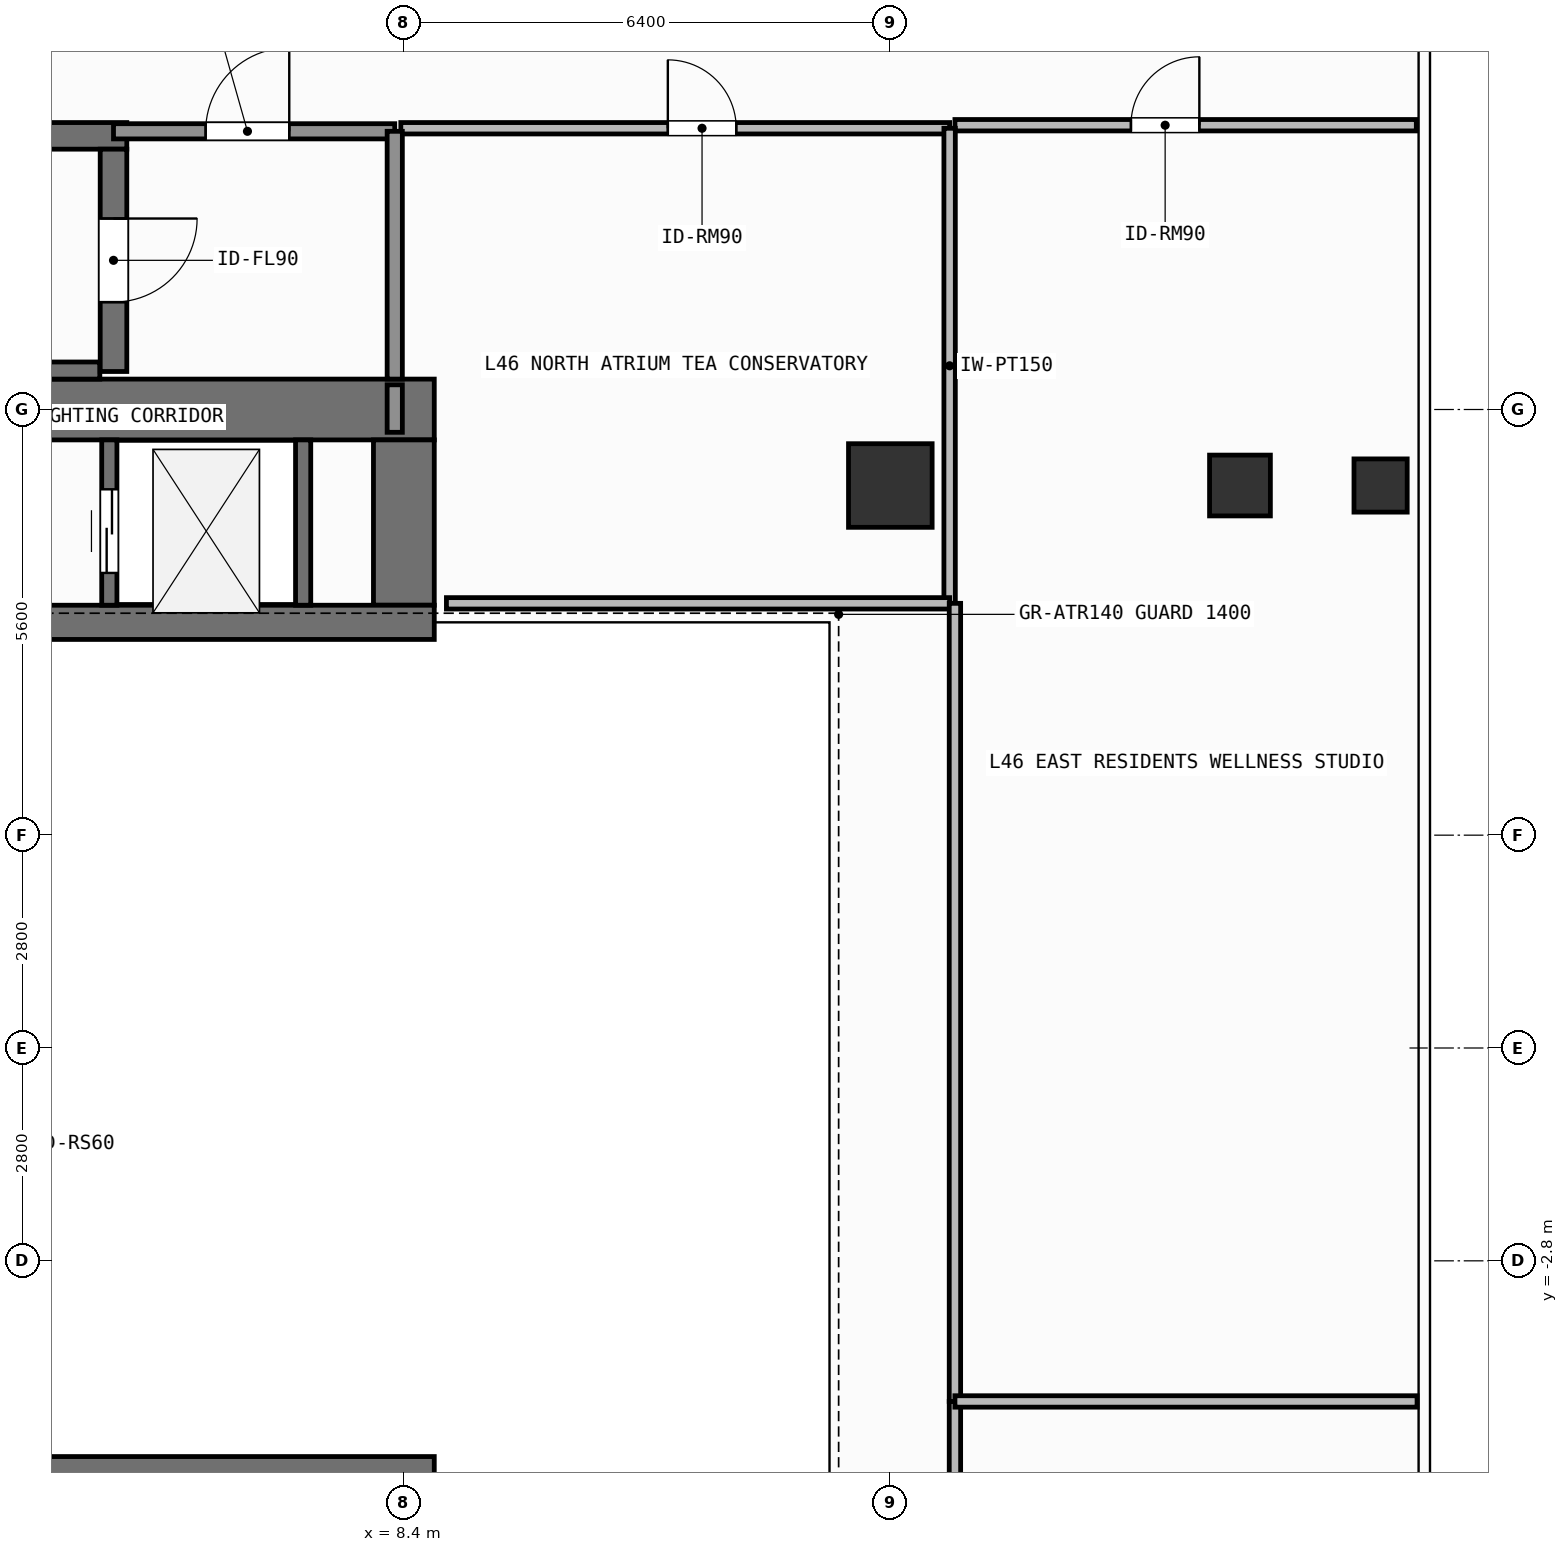
"""IFC4 building model, lengths in metres.
Left out: names, types, materials, properties, quantities, classifications, styles, units other than length and angle.
Written with IfcOpenShell. Run it as: python <this file> out.ifc"""

import sys

from ifc_helpers import new_model, si_unit, direction, frame, frame_2d, origin, origin_2d, place, context, subcontext, project, spatial, rectangle, hollow_rectangle, extrude, element, fill, save


model = new_model("IFC4")
c1 = context("Model", 3, precision=1e-05, world=origin(), true_north=direction((0.0, 1.0)))
c2 = subcontext(c1, "Body", "Model", "MODEL_VIEW")
j1 = project(units=[si_unit("LENGTHUNIT", "METRE"), si_unit("PLANEANGLEUNIT", "RADIAN")], contexts=[c1])
p1 = place(None, origin())
s1 = spatial("IfcSite", under=j1, at=p1, CompositionType="ELEMENT")
p2 = place(p1, origin())
s2 = spatial("IfcBuilding", under=s1, at=p2, CompositionType="ELEMENT")
p3 = place(p2, frame((0.0, 0.0, 187.5)))
s3 = spatial("IfcBuildingStorey", under=s2, at=p3, CompositionType="ELEMENT", Elevation=187.5)
p4 = place(p3, frame((-7.55, 8.4, 0.0), z_axis=(0.0, 0.0, 1.0), x_axis=(1.0, 0.0, 0.0)))
e1 = element("IfcWall", 1, at=p4, inside=s3, PredefinedType="SHEAR", context=c2, shape_type="SweptSolid", body=[
    extrude(rectangle(XDim=16.35, YDim=0.8, at=frame_2d((8.175, 0.0))), origin(), (0.0, 0.0, 1.0), 3.9),
])
p5 = place(p3, frame((8.4, 5.825, 0.0), z_axis=(0.0, 0.0, 1.0), x_axis=(0.0, 1.0, 0.0)))
e2 = element("IfcWall", 2, at=p5, inside=s3, PredefinedType="SHEAR", context=c2, shape_type="SweptSolid", body=[
    extrude(rectangle(XDim=2.175, YDim=0.8, at=frame_2d((1.087, 0.0))), origin(), (0.0, 0.0, 1.0), 3.9),
])
for number, where, z_axis, x_axis in (
    (3, (3.045, -5.6, 0.0), (0.0, 0.0, 1.0), (1.0, 0.0, 0.0)),
    (4, (3.045, 5.6, 0.0), (0.0, 0.0, 1.0), (1.0, 0.0, 0.0)),
):
    element("IfcWall", number, at=place(p3, frame(where, z_axis=z_axis, x_axis=x_axis)), inside=s3, PredefinedType="SHEAR", context=c2, shape_type="SweptSolid", body=[
        extrude(rectangle(XDim=5.755, YDim=0.45, at=frame_2d((2.877, 0.0))), origin(), (0.0, 0.0, 1.0), 3.9),
    ])
p6 = place(p3, frame((-2.555, 12.0, 0.0), z_axis=(0.0, 0.0, 1.0), x_axis=(1.0, 0.0, 0.0)))
e5 = element("IfcWall", 5, at=p6, inside=s3, PredefinedType="SHEAR", context=c2, shape_type="SweptSolid", body=[
    extrude(rectangle(XDim=7.31, YDim=0.35, at=frame_2d((3.655, 0.0))), origin(), (0.0, 0.0, 1.0), 3.9),
])
p7 = place(p3, frame((-2.2, 8.913, 0.0), z_axis=(0.0, 0.0, 1.0), x_axis=(1.0, 0.0, 0.0)))
e6 = element("IfcWall", 6, at=p7, inside=s3, PredefinedType="SHEAR", context=c2, shape_type="SweptSolid", body=[
    extrude(rectangle(XDim=6.6, YDim=0.225, at=frame_2d((3.3, 0.0))), origin(), (0.0, 0.0, 1.0), 3.9),
])
p8 = place(p3, frame((4.58, 11.825, 0.0), z_axis=(0.0, 0.0, 1.0), x_axis=(0.0, -1.0, 0.0)))
e7 = element("IfcWall", 7, at=p8, inside=s3, PredefinedType="SHEAR", context=c2, shape_type="SweptSolid", body=[
    extrude(rectangle(XDim=2.925, YDim=0.35, at=frame_2d((1.462, 0.0))), origin(), (0.0, 0.0, 1.0), 3.9),
])
p9 = place(p8, frame((0.913, 0.0, 0.0)))
e8 = element("IfcOpeningElement", 8, at=p9, cuts=e7, PredefinedType="OPENING", context=c2, shape_type="SweptSolid", body=[
    extrude(rectangle(XDim=1.1, YDim=2.15, at=frame_2d((0.55, 1.075))), frame((0.0, 0.185, 0.0), z_axis=(0.0, -1.0, 0.0), x_axis=(1.0, 0.0, 0.0)), (0.0, 0.0, 1.0), 0.37),
])
p10 = place(p3, frame((14.8, 7.4, 0.0), z_axis=(0.0, 0.0, 1.0), x_axis=(1.0, 0.0, 0.0)))
e9 = element("IfcColumn", 9, at=p10, inside=s3, PredefinedType="COLUMN", context=c2, shape_type="SweptSolid", body=[
    extrude(rectangle(XDim=1.1, YDim=1.1, at=origin_2d()), origin(), (0.0, 0.0, 1.0), 3.9),
])
p11 = place(p3, frame((19.4, 7.4, 0.0), z_axis=(0.0, 0.0, 1.0), x_axis=(1.0, 0.0, 0.0)))
e10 = element("IfcColumn", 10, at=p11, inside=s3, PredefinedType="COLUMN", context=c2, shape_type="SweptSolid", body=[
    extrude(hollow_rectangle(XDim=0.8, YDim=0.8, WallThickness=0.036, at=origin_2d()), origin(), (0.0, 0.0, 1.0), 3.9),
])
p12 = place(p3, frame((21.25, 7.4, 0.0), z_axis=(0.0, 0.0, 1.0), x_axis=(1.0, 0.0, 0.0)))
e11 = element("IfcColumn", 11, at=p12, inside=s3, PredefinedType="COLUMN", context=c2, shape_type="SweptSolid", body=[
    extrude(hollow_rectangle(XDim=0.7, YDim=0.7, WallThickness=0.032, at=origin_2d()), origin(), (0.0, 0.0, 1.0), 3.9),
])
p13 = place(p3, frame((4.525, 5.825, 0.0), z_axis=(0.0, 0.0, 1.0), x_axis=(0.0, 1.0, 0.0)))
e12 = element("IfcWall", 12, at=p13, inside=s3, PredefinedType="SHEAR", context=c2, shape_type="SweptSolid", body=[
    extrude(rectangle(XDim=2.175, YDim=0.2, at=frame_2d((1.087, 0.0))), origin(), (0.0, 0.0, 1.0), 3.62),
])
p14 = place(p13, frame((0.425, 0.0, 0.0)))
e13 = element("IfcOpeningElement", 13, at=p14, cuts=e12, PredefinedType="OPENING", context=c2, shape_type="SweptSolid", body=[
    extrude(rectangle(XDim=1.1, YDim=2.2, at=frame_2d((0.55, 1.1))), frame((0.0, 0.11, 0.0), z_axis=(0.0, -1.0, 0.0), x_axis=(1.0, 0.0, 0.0)), (0.0, 0.0, 1.0), 0.22),
])
p15 = place(p3, frame((7.075, 5.825, 0.0), z_axis=(0.0, 0.0, 1.0), x_axis=(0.0, 1.0, 0.0)))
e14 = element("IfcWall", 14, at=p15, inside=s3, PredefinedType="SHEAR", context=c2, shape_type="SweptSolid", body=[
    extrude(rectangle(XDim=2.175, YDim=0.2, at=frame_2d((1.087, 0.0))), origin(), (0.0, 0.0, 1.0), 3.62),
])
p16 = place(p3, frame((4.58, 12.06, 0.0), z_axis=(0.0, 0.0, 1.0), x_axis=(1.0, 0.0, 0.0)))
e15 = element("IfcWall", 15, at=p16, inside=s3, PredefinedType="SOLIDWALL", context=c2, shape_type="SweptSolid", body=[
    extrude(rectangle(XDim=3.7, YDim=0.2, at=frame_2d((1.85, 0.0))), origin(), (0.0, 0.0, 1.0), 3.62),
])
p17 = place(p16, frame((1.212, 0.0, 0.0)))
e16 = element("IfcOpeningElement", 16, at=p17, cuts=e15, PredefinedType="OPENING", context=c2, shape_type="SweptSolid", body=[
    extrude(rectangle(XDim=1.1, YDim=2.15, at=frame_2d((0.55, 1.075))), frame((0.0, 0.11, 0.0), z_axis=(0.0, -1.0, 0.0), x_axis=(1.0, 0.0, 0.0)), (0.0, 0.0, 1.0), 0.22),
])
p18 = place(p3, frame((8.36, 12.1, 0.0), z_axis=(0.0, 0.0, 1.0), x_axis=(1.0, 0.0, 0.0)))
e17 = element("IfcWall", 17, at=p18, inside=s3, PredefinedType="PARTITIONING", context=c2, shape_type="SweptSolid", body=[
    extrude(rectangle(XDim=7.22, YDim=0.15, at=frame_2d((3.61, 0.0))), origin(), (0.0, 0.0, 1.0), 3.62),
])
p19 = place(p18, frame((3.513, 0.0, 0.0)))
e18 = element("IfcOpeningElement", 18, at=p19, cuts=e17, PredefinedType="OPENING", context=c2, shape_type="SweptSolid", body=[
    extrude(rectangle(XDim=0.9, YDim=2.1, at=frame_2d((0.45, 1.05))), frame((0.0, 0.085, 0.0), z_axis=(0.0, -1.0, 0.0), x_axis=(1.0, 0.0, 0.0)), (0.0, 0.0, 1.0), 0.17),
])
p20 = place(p3, frame((15.65, 12.14, 0.0), z_axis=(0.0, 0.0, 1.0), x_axis=(1.0, 0.0, 0.0)))
e19 = element("IfcWall", 19, at=p20, inside=s3, PredefinedType="PARTITIONING", context=c2, shape_type="SweptSolid", body=[
    extrude(rectangle(XDim=6.07, YDim=0.15, at=frame_2d((3.035, 0.0))), origin(), (0.0, 0.0, 1.0), 3.62),
])
p21 = place(p20, frame((2.316, 0.0, 0.0)))
e20 = element("IfcOpeningElement", 20, at=p21, cuts=e19, PredefinedType="OPENING", context=c2, shape_type="SweptSolid", body=[
    extrude(rectangle(XDim=0.9, YDim=2.1, at=frame_2d((0.45, 1.05))), frame((0.0, 0.085, 0.0), z_axis=(0.0, -1.0, 0.0), x_axis=(1.0, 0.0, 0.0)), (0.0, 0.0, 1.0), 0.17),
])
p22 = place(p3, frame((8.28, 8.8, 0.0), z_axis=(0.0, 0.0, 1.0), x_axis=(0.0, 1.0, 0.0)))
e21 = element("IfcWall", 21, at=p22, inside=s3, PredefinedType="SOLIDWALL", context=c2, shape_type="SweptSolid", body=[
    extrude(rectangle(XDim=3.26, YDim=0.2, at=frame_2d((1.63, 0.0))), origin(), (0.0, 0.0, 1.0), 3.62),
])
p23 = place(p3, frame((8.28, 8.1, 0.0), z_axis=(0.0, 0.0, 1.0), x_axis=(0.0, 1.0, 0.0)))
e22 = element("IfcWall", 22, at=p23, inside=s3, PredefinedType="SOLIDWALL", context=c2, shape_type="SweptSolid", body=[
    extrude(rectangle(XDim=0.625, YDim=0.2, at=frame_2d((0.312, 0.0))), origin(), (0.0, 0.0, 1.0), 3.62),
])
p24 = place(p3, frame((15.58, 5.85, 0.0), z_axis=(0.0, 0.0, 1.0), x_axis=(0.0, 1.0, 0.0)))
e23 = element("IfcWall", 23, at=p24, inside=s3, PredefinedType="PARTITIONING", context=c2, shape_type="SweptSolid", body=[
    extrude(rectangle(XDim=6.25, YDim=0.15, at=frame_2d((3.125, 0.0))), origin(), (0.0, 0.0, 1.0), 3.62),
])
p25 = place(p3, frame((8.96, 5.85, 0.0), z_axis=(0.0, 0.0, 1.0), x_axis=(1.0, 0.0, 0.0)))
e24 = element("IfcWall", 24, at=p25, inside=s3, PredefinedType="PARTITIONING", context=c2, shape_type="SweptSolid", body=[
    extrude(rectangle(XDim=6.62, YDim=0.15, at=frame_2d((3.31, 0.0))), origin(), (0.0, 0.0, 1.0), 3.62),
])
p26 = place(p3, frame((15.65, -5.85, 0.0), z_axis=(0.0, 0.0, 1.0), x_axis=(0.0, 1.0, 0.0)))
e25 = element("IfcWall", 25, at=p26, inside=s3, PredefinedType="PARTITIONING", context=c2, shape_type="SweptSolid", body=[
    extrude(rectangle(XDim=1.2, YDim=0.15, at=frame_2d((0.6, 0.0))), origin(), (0.0, 0.0, 1.0), 3.62),
])
p27 = place(p3, frame((15.65, -4.65, 0.0), z_axis=(0.0, 0.0, 1.0), x_axis=(0.0, 1.0, 0.0)))
e26 = element("IfcWall", 26, at=p27, inside=s3, PredefinedType="PARTITIONING", context=c2, shape_type="SweptSolid", body=[
    extrude(rectangle(XDim=10.5, YDim=0.15, at=frame_2d((5.25, 0.0))), origin(), (0.0, 0.0, 1.0), 3.62),
])
p28 = place(p3, frame((15.65, -4.65, 0.0), z_axis=(0.0, 0.0, 1.0), x_axis=(1.0, 0.0, 0.0)))
e27 = element("IfcWall", 27, at=p28, inside=s3, PredefinedType="PARTITIONING", context=c2, shape_type="SweptSolid", body=[
    extrude(rectangle(XDim=6.08, YDim=0.15, at=frame_2d((3.04, 0.0))), origin(), (0.0, 0.0, 1.0), 3.62),
])
p29 = place(p14, origin())
e28 = element("IfcDoor", 28, at=p29, inside=s3, OperationType="SLIDING_TO_LEFT", PredefinedType="DOOR", context=c2, shape_type="SweptSolid", body=[
    extrude(rectangle(XDim=1.1, YDim=2.2, at=frame_2d((0.55, 1.1))), frame((0.0, 0.025, 0.0), z_axis=(0.0, -1.0, 0.0), x_axis=(1.0, 0.0, 0.0)), (0.0, 0.0, 1.0), 0.05),
])
fill(e13, e28)
p30 = place(p9, origin())
e29 = element("IfcDoor", 29, at=p30, inside=s3, OperationType="SINGLE_SWING_LEFT", PredefinedType="DOOR", context=c2, shape_type="SweptSolid", body=[
    extrude(rectangle(XDim=1.1, YDim=2.15, at=frame_2d((0.55, 1.075))), frame((0.0, 0.025, 0.0), z_axis=(0.0, -1.0, 0.0), x_axis=(1.0, 0.0, 0.0)), (0.0, 0.0, 1.0), 0.05),
])
fill(e8, e29)
p31 = place(p17, origin())
e30 = element("IfcDoor", 30, at=p31, inside=s3, OperationType="SINGLE_SWING_RIGHT", PredefinedType="DOOR", context=c2, shape_type="SweptSolid", body=[
    extrude(rectangle(XDim=1.1, YDim=2.15, at=frame_2d((0.55, 1.075))), frame((0.0, 0.025, 0.0), z_axis=(0.0, -1.0, 0.0), x_axis=(1.0, 0.0, 0.0)), (0.0, 0.0, 1.0), 0.05),
])
fill(e16, e30)
p32 = place(p19, origin())
e31 = element("IfcDoor", 31, at=p32, inside=s3, OperationType="SINGLE_SWING_LEFT", PredefinedType="DOOR", context=c2, shape_type="SweptSolid", body=[
    extrude(rectangle(XDim=0.9, YDim=2.1, at=frame_2d((0.45, 1.05))), frame((0.0, 0.025, 0.0), z_axis=(0.0, -1.0, 0.0), x_axis=(1.0, 0.0, 0.0)), (0.0, 0.0, 1.0), 0.05),
])
fill(e18, e31)
p33 = place(p21, origin())
e32 = element("IfcDoor", 32, at=p33, inside=s3, OperationType="SINGLE_SWING_RIGHT", PredefinedType="DOOR", context=c2, shape_type="SweptSolid", body=[
    extrude(rectangle(XDim=0.9, YDim=2.1, at=frame_2d((0.45, 1.05))), frame((0.0, 0.025, 0.0), z_axis=(0.0, -1.0, 0.0), x_axis=(1.0, 0.0, 0.0)), (0.0, 0.0, 1.0), 0.05),
])
fill(e20, e32)
save(model, sys.argv[1])
